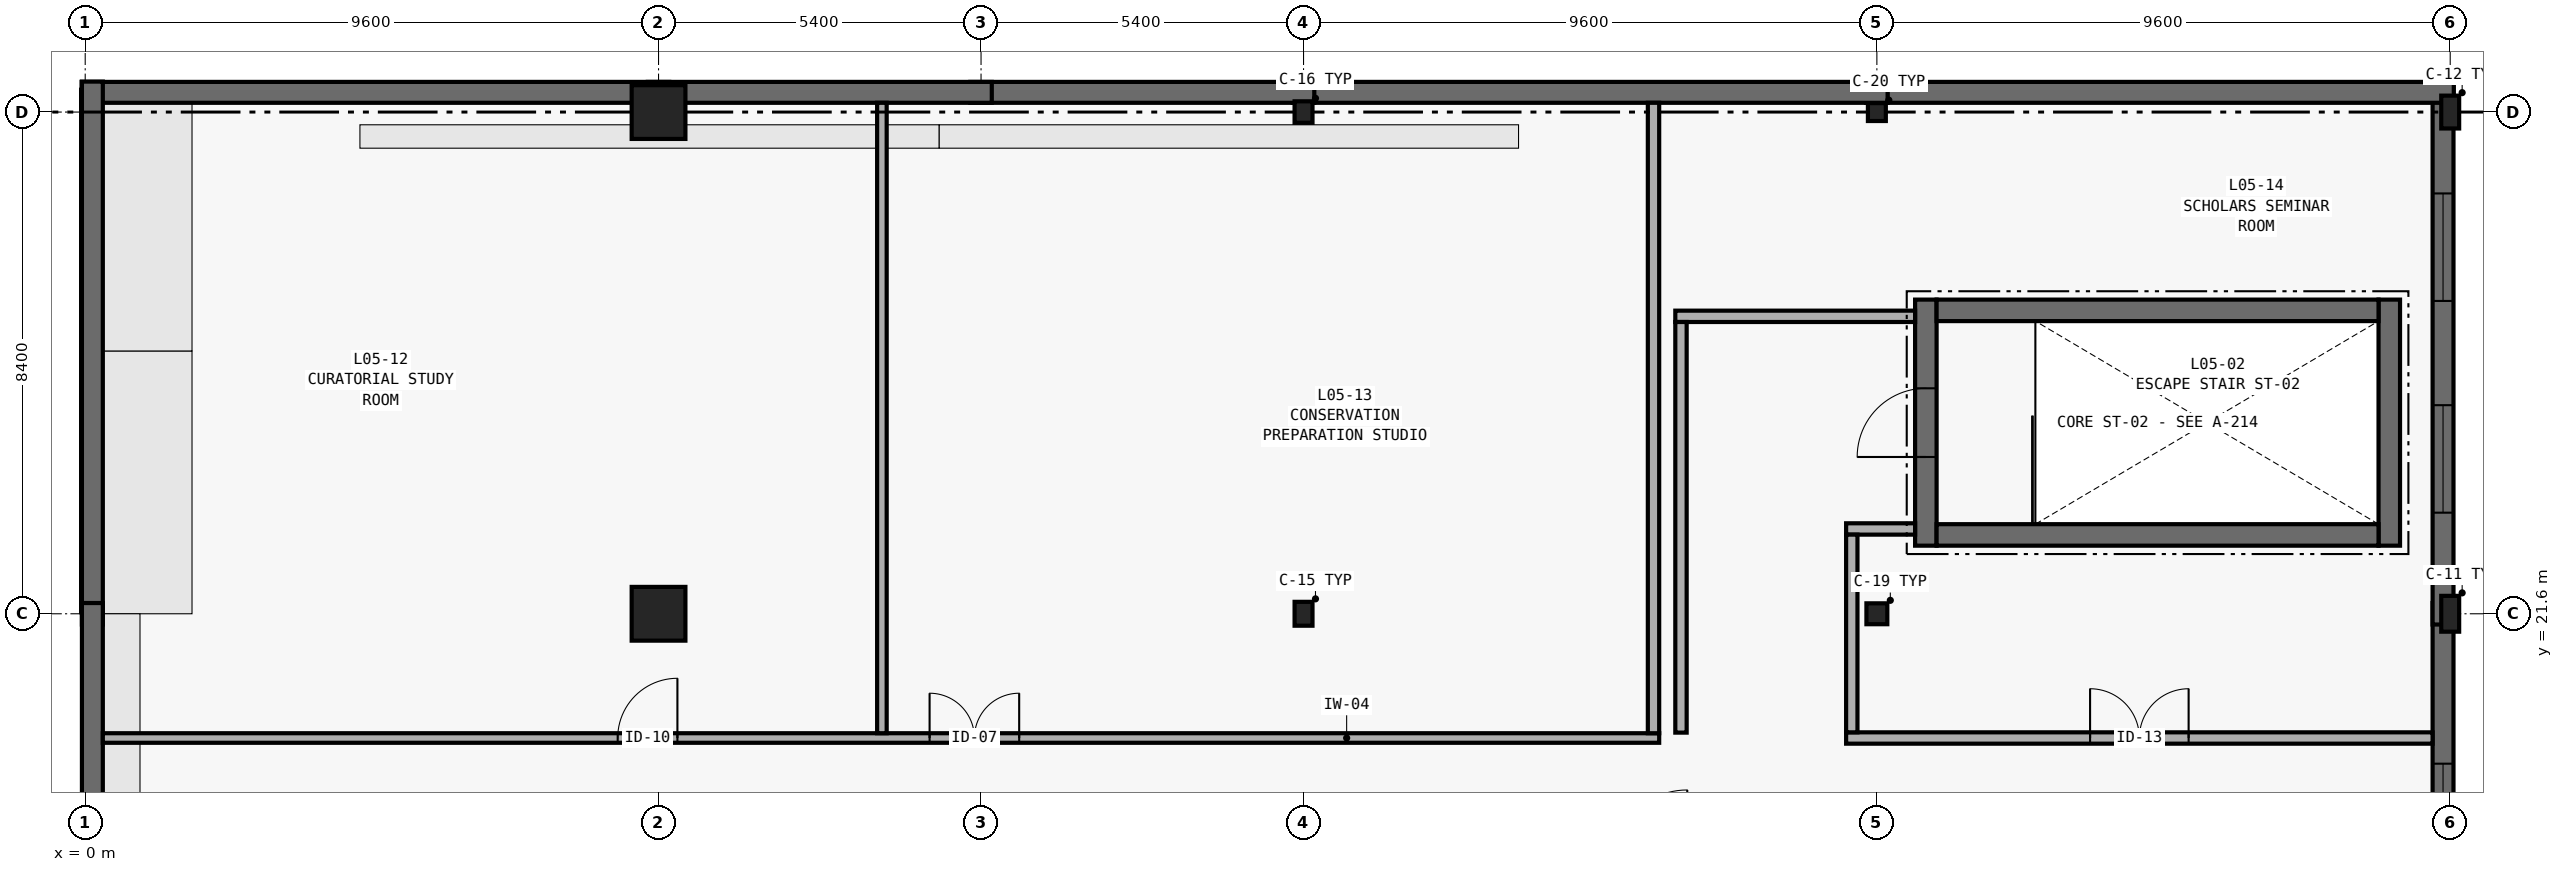
"""IFC4 building model, lengths in metres.
Left out: names, types, materials, properties, quantities, classifications, styles, units other than length and angle.
Written with IfcOpenShell. Run it as: python <this file> out.ifc"""

import sys

from ifc_helpers import new_model, si_unit, direction, frame, frame_2d, origin, origin_2d, place, context, subcontext, project, spatial, rectangle, hollow_rectangle, i_section, extrude, element, fill, save


model = new_model("IFC4")
c1 = context("Model", 3, precision=1e-05, world=origin(), true_north=direction((0.0, 1.0)))
c2 = subcontext(c1, "Body", "Model", "MODEL_VIEW")
j1 = project(units=[si_unit("LENGTHUNIT", "METRE"), si_unit("PLANEANGLEUNIT", "RADIAN")], contexts=[c1])
p1 = place(None, origin())
s1 = spatial("IfcSite", under=j1, at=p1, CompositionType="ELEMENT")
p2 = place(p1, origin())
s2 = spatial("IfcBuilding", under=s1, at=p2, CompositionType="ELEMENT")
p3 = place(p2, frame((0.0, 0.0, 25.5)))
s3 = spatial("IfcBuildingStorey", under=s2, at=p3, CompositionType="ELEMENT", Elevation=25.5)
for number, where, z_axis, x_axis in (
    (1, (9.6, 21.6, 0.0), (0.0, 0.0, 1.0), (1.0, 0.0, 0.0)),
    (2, (9.6, 30.0, 0.0), (0.0, 0.0, 1.0), (1.0, 0.0, 0.0)),
):
    element("IfcColumn", number, at=place(p3, frame(where, z_axis=z_axis, x_axis=x_axis)), inside=s3, PredefinedType="COLUMN", context=c2, shape_type="SweptSolid", body=[
        extrude(rectangle(XDim=0.9, YDim=0.9, at=origin_2d()), origin(), (0.0, 0.0, 1.0), 4.2),
    ])
p4 = place(p3, frame((20.4, 21.6, 0.0), z_axis=(0.0, 0.0, 1.0), x_axis=(1.0, 0.0, 0.0)))
e3 = element("IfcColumn", 3, at=p4, inside=s3, PredefinedType="COLUMN", context=c2, shape_type="SweptSolid", body=[
    extrude(i_section(OverallWidth=0.3, OverallDepth=0.4, WebThickness=0.013, FlangeThickness=0.024, FilletRadius=0.027, at=origin_2d()), origin(), (0.0, 0.0, 1.0), 4.2),
])
p5 = place(p3, frame((20.4, 30.0, 0.0), z_axis=(0.0, 0.0, 1.0), x_axis=(1.0, 0.0, 0.0)))
e4 = element("IfcColumn", 4, at=p5, inside=s3, PredefinedType="COLUMN", context=c2, shape_type="SweptSolid", body=[
    extrude(i_section(OverallWidth=0.3, OverallDepth=0.36, WebThickness=0.012, FlangeThickness=0.022, FilletRadius=0.027, at=origin_2d()), origin(), (0.0, 0.0, 1.0), 4.2),
])
p6 = place(p3, frame((30.0, 21.6, 0.0), z_axis=(0.0, 0.0, 1.0), x_axis=(1.0, 0.0, 0.0)))
e5 = element("IfcColumn", 5, at=p6, inside=s3, PredefinedType="COLUMN", context=c2, shape_type="SweptSolid", body=[
    extrude(hollow_rectangle(XDim=0.35, YDim=0.35, WallThickness=0.016, at=origin_2d()), origin(), (0.0, 0.0, 1.0), 4.2),
])
p7 = place(p3, frame((30.0, 30.0, 0.0), z_axis=(0.0, 0.0, 1.0), x_axis=(1.0, 0.0, 0.0)))
e6 = element("IfcColumn", 6, at=p7, inside=s3, PredefinedType="COLUMN", context=c2, shape_type="SweptSolid", body=[
    extrude(hollow_rectangle(XDim=0.3, YDim=0.3, WallThickness=0.016, at=origin_2d()), origin(), (0.0, 0.0, 1.0), 4.2),
])
p8 = place(p3, frame((39.6, 21.6, 0.0), z_axis=(0.0, 0.0, 1.0), x_axis=(1.0, 0.0, 0.0)))
e7 = element("IfcColumn", 7, at=p8, inside=s3, PredefinedType="COLUMN", context=c2, shape_type="SweptSolid", body=[
    extrude(i_section(OverallWidth=0.3, OverallDepth=0.6, WebThickness=0.015, FlangeThickness=0.03, FilletRadius=0.027, at=origin_2d()), origin(), (0.0, 0.0, 1.0), 4.2),
])
p9 = place(p3, frame((39.6, 30.0, 0.0), z_axis=(0.0, 0.0, 1.0), x_axis=(1.0, 0.0, 0.0)))
e8 = element("IfcColumn", 8, at=p9, inside=s3, PredefinedType="COLUMN", context=c2, shape_type="SweptSolid", body=[
    extrude(i_section(OverallWidth=0.3, OverallDepth=0.55, WebThickness=0.015, FlangeThickness=0.029, FilletRadius=0.027, at=origin_2d()), origin(), (0.0, 0.0, 1.0), 4.2),
])
p10 = place(p3, frame((39.48, 9.42, 0.0), z_axis=(0.0, 0.0, 1.0), x_axis=(0.0, 1.0, 0.0)))
e9 = element("IfcWall", 9, at=p10, inside=s3, PredefinedType="STANDARD", context=c2, shape_type="SweptSolid", body=[
    extrude(rectangle(XDim=12.36, YDim=0.35, at=frame_2d((6.18, 0.0))), origin(), (0.0, 0.0, 1.0), 3.9),
])
p11 = place(p10, frame((2.19, 0.0, 1.8)))
e10 = element("IfcOpeningElement", 10, at=p11, cuts=e9, PredefinedType="OPENING", context=c2, shape_type="SweptSolid", body=[
    extrude(rectangle(XDim=1.8, YDim=1.1, at=frame_2d((0.9, 0.55))), frame((0.0, 0.19, 0.0), z_axis=(0.0, -1.0, 0.0), x_axis=(1.0, 0.0, 0.0)), (0.0, 0.0, 1.0), 0.38),
])
p12 = place(p10, frame((7.87, 0.0, 1.8)))
e11 = element("IfcOpeningElement", 11, at=p12, cuts=e9, PredefinedType="OPENING", context=c2, shape_type="SweptSolid", body=[
    extrude(rectangle(XDim=1.8, YDim=1.1, at=frame_2d((0.9, 0.55))), frame((0.0, 0.19, 0.0), z_axis=(0.0, -1.0, 0.0), x_axis=(1.0, 0.0, 0.0)), (0.0, 0.0, 1.0), 0.38),
])
p13 = place(p3, frame((39.48, 21.42, 0.0), z_axis=(0.0, 0.0, 1.0), x_axis=(0.0, 1.0, 0.0)))
e12 = element("IfcWall", 12, at=p13, inside=s3, PredefinedType="STANDARD", context=c2, shape_type="SweptSolid", body=[
    extrude(rectangle(XDim=9.09, YDim=0.35, at=frame_2d((4.545, 0.0))), origin(), (0.0, 0.0, 1.0), 3.9),
])
p14 = place(p13, frame((1.873, 0.0, 0.9)))
e13 = element("IfcOpeningElement", 13, at=p14, cuts=e12, PredefinedType="OPENING", context=c2, shape_type="SweptSolid", body=[
    extrude(rectangle(XDim=1.8, YDim=1.1, at=frame_2d((0.9, 0.55))), frame((0.0, 0.19, 0.0), z_axis=(0.0, -1.0, 0.0), x_axis=(1.0, 0.0, 0.0)), (0.0, 0.0, 1.0), 0.38),
])
p15 = place(p13, frame((5.417, 0.0, 0.9)))
e14 = element("IfcOpeningElement", 14, at=p15, cuts=e12, PredefinedType="OPENING", context=c2, shape_type="SweptSolid", body=[
    extrude(rectangle(XDim=1.8, YDim=1.1, at=frame_2d((0.9, 0.55))), frame((0.0, 0.19, 0.0), z_axis=(0.0, -1.0, 0.0), x_axis=(1.0, 0.0, 0.0)), (0.0, 0.0, 1.0), 0.38),
])
p16 = place(p3, frame((39.66, 30.33, 0.0), z_axis=(0.0, 0.0, 1.0), x_axis=(-1.0, 0.0, 0.0)))
e15 = element("IfcWall", 15, at=p16, inside=s3, PredefinedType="STANDARD", context=c2, shape_type="SweptSolid", body=[
    extrude(rectangle(XDim=9.84, YDim=0.35, at=frame_2d((4.92, 0.0))), origin(), (0.0, 0.0, 1.0), 3.9),
])
p17 = place(p3, frame((30.18, 30.33, 0.0), z_axis=(0.0, 0.0, 1.0), x_axis=(-1.0, 0.0, 0.0)))
e16 = element("IfcWall", 16, at=p17, inside=s3, PredefinedType="STANDARD", context=c2, shape_type="SweptSolid", body=[
    extrude(rectangle(XDim=9.96, YDim=0.35, at=frame_2d((4.98, 0.0))), origin(), (0.0, 0.0, 1.0), 3.9),
])
for number, where, z_axis, x_axis in (
    (17, (20.58, 30.33, 0.0), (0.0, 0.0, 1.0), (-1.0, 0.0, 0.0)),
    (18, (15.18, 30.33, 0.0), (0.0, 0.0, 1.0), (-1.0, 0.0, 0.0)),
):
    element("IfcWall", number, at=place(p3, frame(where, z_axis=z_axis, x_axis=x_axis)), inside=s3, PredefinedType="STANDARD", context=c2, shape_type="SweptSolid", body=[
        extrude(rectangle(XDim=5.76, YDim=0.35, at=frame_2d((2.88, 0.0))), origin(), (0.0, 0.0, 1.0), 3.9),
    ])
p18 = place(p3, frame((9.78, 30.33, 0.0), z_axis=(0.0, 0.0, 1.0), x_axis=(-1.0, 0.0, 0.0)))
e19 = element("IfcWall", 19, at=p18, inside=s3, PredefinedType="STANDARD", context=c2, shape_type="SweptSolid", body=[
    extrude(rectangle(XDim=9.84, YDim=0.35, at=frame_2d((4.92, 0.0))), origin(), (0.0, 0.0, 1.0), 3.9),
])
p19 = place(p3, frame((0.12, 30.51, 0.0), z_axis=(0.0, 0.0, 1.0), x_axis=(0.0, -1.0, 0.0)))
e20 = element("IfcWall", 20, at=p19, inside=s3, PredefinedType="STANDARD", context=c2, shape_type="SweptSolid", body=[
    extrude(rectangle(XDim=9.09, YDim=0.35, at=frame_2d((4.545, 0.0))), origin(), (0.0, 0.0, 1.0), 3.9),
])
p20 = place(p3, frame((0.12, 21.78, 0.0), z_axis=(0.0, 0.0, 1.0), x_axis=(0.0, -1.0, 0.0)))
e21 = element("IfcWall", 21, at=p20, inside=s3, PredefinedType="STANDARD", context=c2, shape_type="SweptSolid", body=[
    extrude(rectangle(XDim=12.36, YDim=0.35, at=frame_2d((6.18, 0.0))), origin(), (0.0, 0.0, 1.0), 3.9),
])
p21 = place(p3, frame((30.82, 22.74, 0.0), z_axis=(0.0, 0.0, 1.0), x_axis=(0.0, 1.0, 0.0)))
e22 = element("IfcWall", 22, at=p21, inside=s3, PredefinedType="SHEAR", context=c2, shape_type="SweptSolid", body=[
    extrude(rectangle(XDim=4.12, YDim=0.36, at=frame_2d((2.06, 0.0))), origin(), (0.0, 0.0, 1.0), 3.96),
])
p22 = place(p21, frame((1.485, 0.0, 0.0)))
e23 = element("IfcOpeningElement", 23, at=p22, cuts=e22, PredefinedType="OPENING", context=c2, shape_type="SweptSolid", body=[
    extrude(rectangle(XDim=1.15, YDim=2.15, at=frame_2d((0.575, 1.075))), frame((0.0, 0.195, 0.0), z_axis=(0.0, -1.0, 0.0), x_axis=(1.0, 0.0, 0.0)), (0.0, 0.0, 1.0), 0.39),
])
p23 = place(p3, frame((38.58, 22.74, 0.0), z_axis=(0.0, 0.0, 1.0), x_axis=(0.0, 1.0, 0.0)))
e24 = element("IfcWall", 24, at=p23, inside=s3, PredefinedType="SHEAR", context=c2, shape_type="SweptSolid", body=[
    extrude(rectangle(XDim=4.12, YDim=0.36, at=frame_2d((2.06, 0.0))), origin(), (0.0, 0.0, 1.0), 3.96),
])
for number, where, z_axis, x_axis in (
    (25, (31.0, 26.68, 0.0), (0.0, 0.0, 1.0), (1.0, 0.0, 0.0)),
    (26, (31.0, 22.92, 0.0), (0.0, 0.0, 1.0), (1.0, 0.0, 0.0)),
):
    element("IfcWall", number, at=place(p3, frame(where, z_axis=z_axis, x_axis=x_axis)), inside=s3, PredefinedType="SHEAR", context=c2, shape_type="SweptSolid", body=[
        extrude(rectangle(XDim=7.4, YDim=0.36, at=frame_2d((3.7, 0.0))), origin(), (0.0, 0.0, 1.0), 3.96),
    ])
p24 = place(p3, frame((0.295, 19.52, 0.0), z_axis=(0.0, 0.0, 1.0), x_axis=(1.0, 0.0, 0.0)))
e27 = element("IfcWall", 27, at=p24, inside=s3, PredefinedType="PARTITIONING", context=c2, shape_type="SweptSolid", body=[
    extrude(rectangle(XDim=26.06, YDim=0.16, at=frame_2d((13.03, 0.0))), origin(), (0.0, 0.0, 1.0), 2.84),
])
p25 = place(p24, frame((8.621, 0.0, 0.0)))
e28 = element("IfcOpeningElement", 28, at=p25, cuts=e27, PredefinedType="OPENING", context=c2, shape_type="SweptSolid", body=[
    extrude(rectangle(XDim=1.0, YDim=2.15, at=frame_2d((0.5, 1.075))), frame((0.0, 0.095, 0.0), z_axis=(0.0, -1.0, 0.0), x_axis=(1.0, 0.0, 0.0)), (0.0, 0.0, 1.0), 0.19),
])
p26 = place(p24, frame((13.844, 0.0, 0.0)))
e29 = element("IfcOpeningElement", 29, at=p26, cuts=e27, PredefinedType="OPENING", context=c2, shape_type="SweptSolid", body=[
    extrude(rectangle(XDim=1.5, YDim=2.2, at=frame_2d((0.75, 1.1))), frame((0.0, 0.095, 0.0), z_axis=(0.0, -1.0, 0.0), x_axis=(1.0, 0.0, 0.0)), (0.0, 0.0, 1.0), 0.19),
])
p27 = place(p3, frame((29.485, 19.52, 0.0), z_axis=(0.0, 0.0, 1.0), x_axis=(1.0, 0.0, 0.0)))
e30 = element("IfcWall", 30, at=p27, inside=s3, PredefinedType="PARTITIONING", context=c2, shape_type="SweptSolid", body=[
    extrude(rectangle(XDim=9.82, YDim=0.19, at=frame_2d((4.91, 0.0))), origin(), (0.0, 0.0, 1.0), 2.84),
])
p28 = place(p27, frame((4.085, 0.0, 0.0)))
e31 = element("IfcOpeningElement", 31, at=p28, cuts=e30, PredefinedType="OPENING", context=c2, shape_type="SweptSolid", body=[
    extrude(rectangle(XDim=1.65, YDim=2.25, at=frame_2d((0.825, 1.125))), frame((0.0, 0.11, 0.0), z_axis=(0.0, -1.0, 0.0), x_axis=(1.0, 0.0, 0.0)), (0.0, 0.0, 1.0), 0.22),
])
p29 = place(p3, frame((29.485, 23.02, 0.0), z_axis=(0.0, 0.0, 1.0), x_axis=(1.0, 0.0, 0.0)))
e32 = element("IfcWall", 32, at=p29, inside=s3, PredefinedType="PARTITIONING", context=c2, shape_type="SweptSolid", body=[
    extrude(rectangle(XDim=1.155, YDim=0.19, at=frame_2d((0.577, 0.0))), origin(), (0.0, 0.0, 1.0), 2.84),
])
p30 = place(p3, frame((26.625, 26.58, 0.0), z_axis=(0.0, 0.0, 1.0), x_axis=(1.0, 0.0, 0.0)))
e33 = element("IfcWall", 33, at=p30, inside=s3, PredefinedType="PARTITIONING", context=c2, shape_type="SweptSolid", body=[
    extrude(rectangle(XDim=4.015, YDim=0.19, at=frame_2d((2.007, 0.0))), origin(), (0.0, 0.0, 1.0), 2.84),
])
p31 = place(p3, frame((13.34, 19.6, 0.0), z_axis=(0.0, 0.0, 1.0), x_axis=(0.0, 1.0, 0.0)))
e34 = element("IfcWall", 34, at=p31, inside=s3, PredefinedType="PARTITIONING", context=c2, shape_type="SweptSolid", body=[
    extrude(rectangle(XDim=10.555, YDim=0.16, at=frame_2d((5.277, 0.0))), origin(), (0.0, 0.0, 1.0), 2.84),
])
p32 = place(p3, frame((26.26, 19.6, 0.0), z_axis=(0.0, 0.0, 1.0), x_axis=(0.0, 1.0, 0.0)))
e35 = element("IfcWall", 35, at=p32, inside=s3, PredefinedType="PARTITIONING", context=c2, shape_type="SweptSolid", body=[
    extrude(rectangle(XDim=10.555, YDim=0.19, at=frame_2d((5.277, 0.0))), origin(), (0.0, 0.0, 1.0), 2.84),
])
p33 = place(p3, frame((26.72, 19.61, 0.0), z_axis=(0.0, 0.0, 1.0), x_axis=(0.0, 1.0, 0.0)))
e36 = element("IfcWall", 36, at=p33, inside=s3, PredefinedType="PARTITIONING", context=c2, shape_type="SweptSolid", body=[
    extrude(rectangle(XDim=6.875, YDim=0.19, at=frame_2d((3.438, 0.0))), origin(), (0.0, 0.0, 1.0), 2.84),
])
p34 = place(p3, frame((29.58, 19.615, 0.0), z_axis=(0.0, 0.0, 1.0), x_axis=(0.0, 1.0, 0.0)))
e37 = element("IfcWall", 37, at=p34, inside=s3, PredefinedType="PARTITIONING", context=c2, shape_type="SweptSolid", body=[
    extrude(rectangle(XDim=3.31, YDim=0.19, at=frame_2d((1.655, 0.0))), origin(), (0.0, 0.0, 1.0), 2.84),
])
p35 = place(p12, origin())
e38 = element("IfcWindow", 38, at=p35, inside=s3, PartitioningType="SINGLE_PANEL", PredefinedType="WINDOW", context=c2, shape_type="SweptSolid", body=[
    extrude(rectangle(XDim=1.8, YDim=1.1, at=frame_2d((0.9, 0.55))), frame((0.0, 0.03, 0.0), z_axis=(0.0, -1.0, 0.0), x_axis=(1.0, 0.0, 0.0)), (0.0, 0.0, 1.0), 0.06),
])
fill(e11, e38)
p36 = place(p14, origin())
e39 = element("IfcWindow", 39, at=p36, inside=s3, PartitioningType="SINGLE_PANEL", PredefinedType="WINDOW", context=c2, shape_type="SweptSolid", body=[
    extrude(rectangle(XDim=1.8, YDim=1.1, at=frame_2d((0.9, 0.55))), frame((0.0, 0.03, 0.0), z_axis=(0.0, -1.0, 0.0), x_axis=(1.0, 0.0, 0.0)), (0.0, 0.0, 1.0), 0.06),
])
fill(e13, e39)
p37 = place(p15, origin())
e40 = element("IfcWindow", 40, at=p37, inside=s3, PartitioningType="SINGLE_PANEL", PredefinedType="WINDOW", context=c2, shape_type="SweptSolid", body=[
    extrude(rectangle(XDim=1.8, YDim=1.1, at=frame_2d((0.9, 0.55))), frame((0.0, 0.03, 0.0), z_axis=(0.0, -1.0, 0.0), x_axis=(1.0, 0.0, 0.0)), (0.0, 0.0, 1.0), 0.06),
])
fill(e14, e40)
p38 = place(p22, origin())
e41 = element("IfcDoor", 41, at=p38, inside=s3, OperationType="SINGLE_SWING_LEFT", PredefinedType="DOOR", context=c2, shape_type="SweptSolid", body=[
    extrude(rectangle(XDim=1.15, YDim=2.15, at=frame_2d((0.575, 1.075))), frame((0.0, 0.025, 0.0), z_axis=(0.0, -1.0, 0.0), x_axis=(1.0, 0.0, 0.0)), (0.0, 0.0, 1.0), 0.05),
])
fill(e23, e41)
p39 = place(p25, origin())
e42 = element("IfcDoor", 42, at=p39, inside=s3, OperationType="SINGLE_SWING_RIGHT", PredefinedType="DOOR", context=c2, shape_type="SweptSolid", body=[
    extrude(rectangle(XDim=1.0, YDim=2.15, at=frame_2d((0.5, 1.075))), frame((0.0, 0.025, 0.0), z_axis=(0.0, -1.0, 0.0), x_axis=(1.0, 0.0, 0.0)), (0.0, 0.0, 1.0), 0.05),
])
fill(e28, e42)
p40 = place(p26, origin())
e43 = element("IfcDoor", 43, at=p40, inside=s3, OperationType="DOUBLE_DOOR_SINGLE_SWING", PredefinedType="DOOR", context=c2, shape_type="SweptSolid", body=[
    extrude(rectangle(XDim=1.5, YDim=2.2, at=frame_2d((0.75, 1.1))), frame((0.0, 0.025, 0.0), z_axis=(0.0, -1.0, 0.0), x_axis=(1.0, 0.0, 0.0)), (0.0, 0.0, 1.0), 0.05),
])
fill(e29, e43)
p41 = place(p28, origin())
e44 = element("IfcDoor", 44, at=p41, inside=s3, OperationType="DOUBLE_DOOR_SINGLE_SWING", PredefinedType="DOOR", context=c2, shape_type="SweptSolid", body=[
    extrude(rectangle(XDim=1.65, YDim=2.25, at=frame_2d((0.825, 1.125))), frame((0.0, 0.025, 0.0), z_axis=(0.0, -1.0, 0.0), x_axis=(1.0, 0.0, 0.0)), (0.0, 0.0, 1.0), 0.05),
])
fill(e31, e44)
save(model, sys.argv[1])
